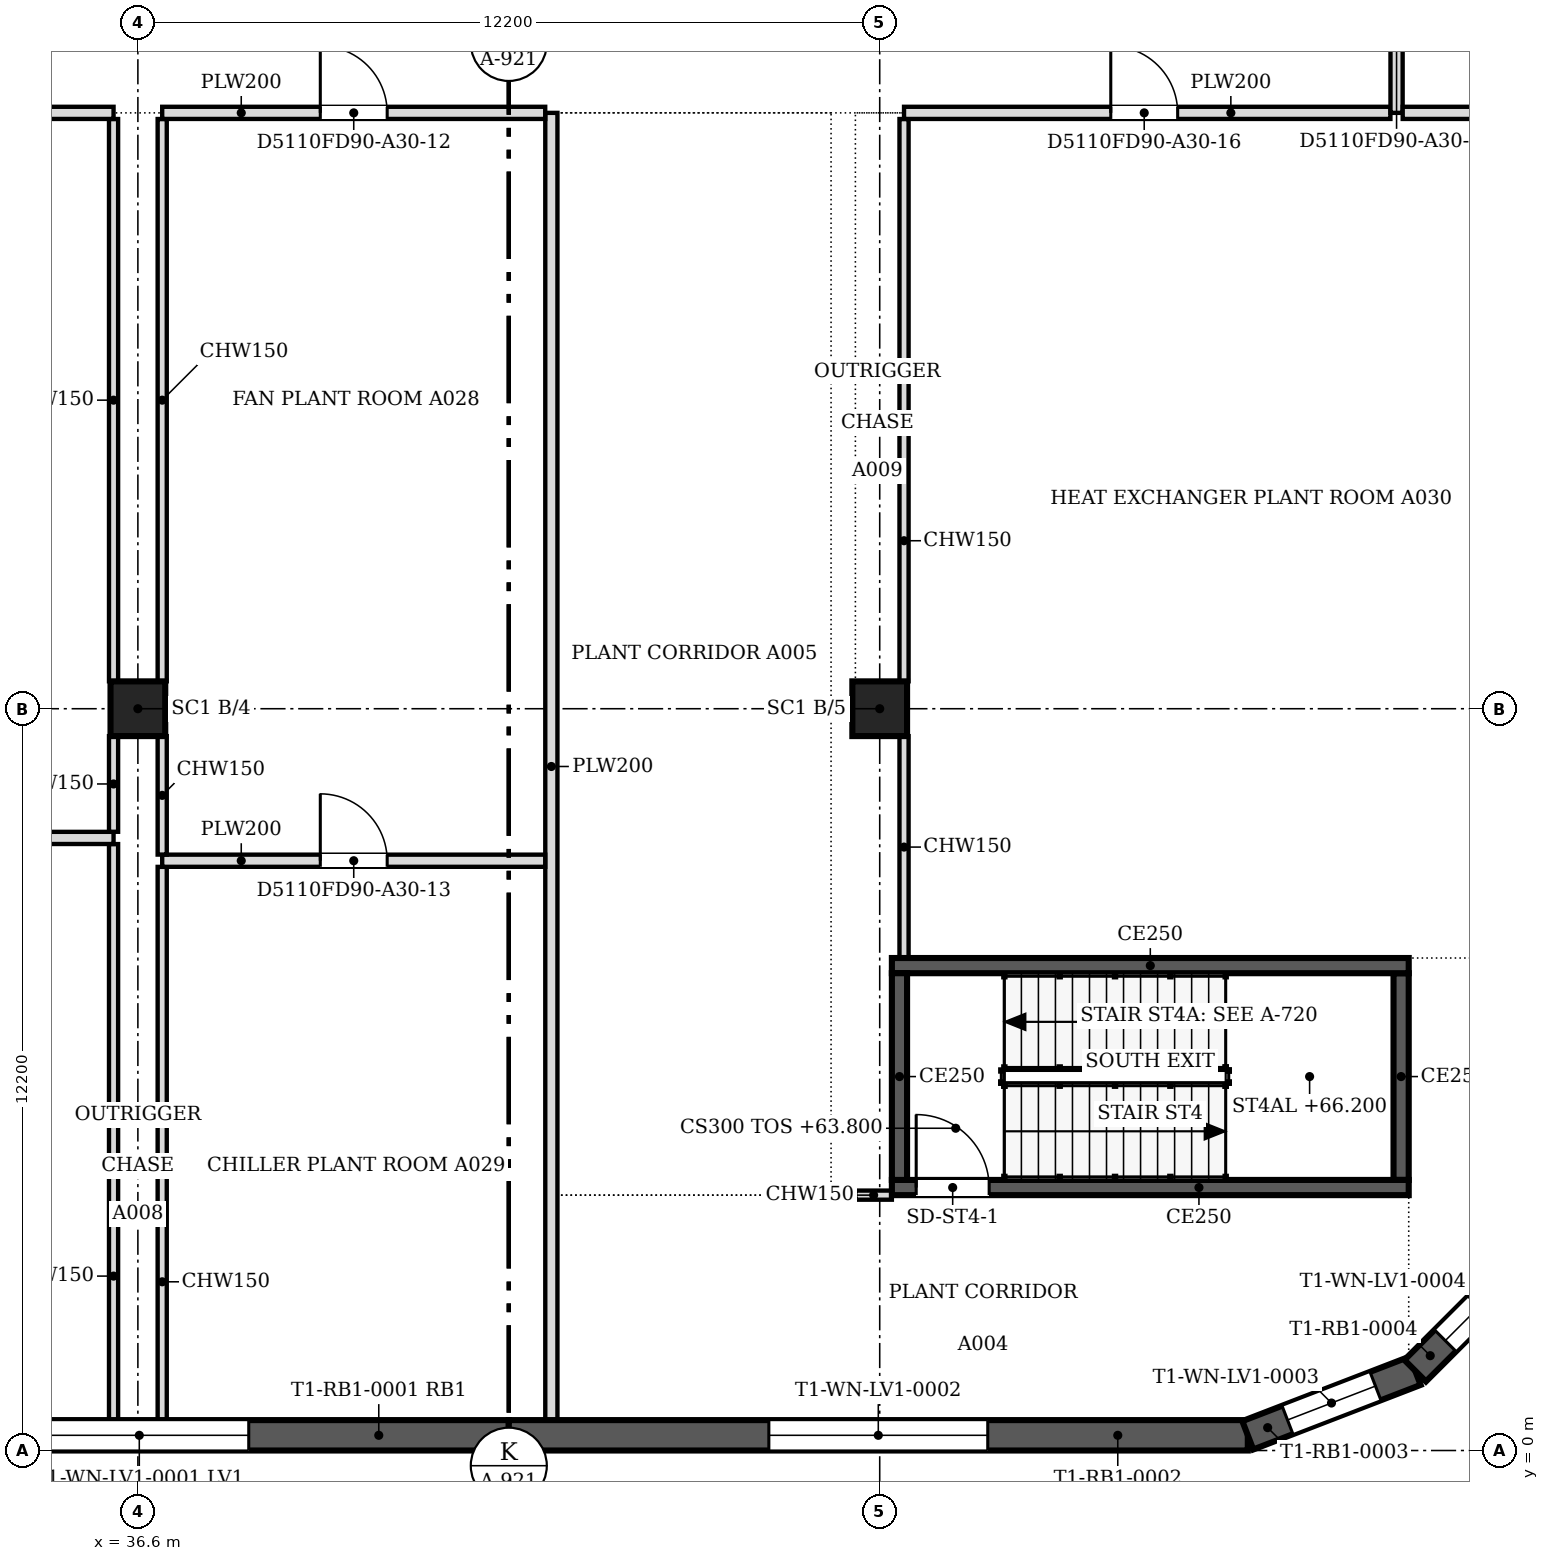
"""IFC4 building model, lengths in metres.
Left out: names, types, materials, properties, quantities, classifications, styles, units other than length and angle.
Written with IfcOpenShell. Run it as: python <this file> out.ifc"""

import sys

from ifc_helpers import new_model, si_unit, direction, frame, frame_2d, origin, origin_2d, place, context, subcontext, project, spatial, polyline, rectangle, outline, extrude, faceted_brep, source, transform, mapped, element, fill, save


model = new_model("IFC4")
c1 = context("Model", 3, precision=1e-05, world=origin(), true_north=direction((0.0, 1.0)))
c2 = subcontext(c1, "Body", "Model", "MODEL_VIEW")
j1 = project(units=[si_unit("LENGTHUNIT", "METRE"), si_unit("PLANEANGLEUNIT", "RADIAN")], contexts=[c1])
p1 = place(None, origin())
s1 = spatial("IfcSite", under=j1, at=p1, CompositionType="ELEMENT")
p2 = place(p1, origin())
s2 = spatial("IfcBuilding", under=s1, at=p2, CompositionType="ELEMENT")
p3 = place(p2, frame((0.0, 0.0, 63.8)))
s3 = spatial("IfcBuildingStorey", under=s2, at=p3, CompositionType="ELEMENT", Elevation=63.8)
for number, where, z_axis, x_axis in (
    (1, (36.6, 12.2, 0.0), (0.0, 0.0, 1.0), (1.0, 0.0, 0.0)),
    (2, (48.8, 12.2, 0.0), (0.0, 0.0, 1.0), (1.0, 0.0, 0.0)),
):
    element("IfcColumn", number, at=place(p3, frame(where, z_axis=z_axis, x_axis=x_axis)), inside=s3, PredefinedType="COLUMN", context=c2, shape_type="SweptSolid", body=[
        extrude(rectangle(XDim=0.9, YDim=0.9, at=origin_2d()), origin(), (0.0, 0.0, 1.0), 4.6),
    ])
m1 = source(origin(), c2, "Body", "Brep", [
    faceted_brep([(0.0, -0.25, 0.0), (12.154, -0.25, 0.0), (12.154, -0.25, 4.8), (0.0, -0.25, 4.8), (0.047, 0.25, 4.8), (12.154, 0.25, 4.8), (12.154, 0.25, 0.0), (0.047, 0.25, 0.0), (0.0, 0.0, 0.0), (0.0, 0.0, 4.8)], [[[0, 1, 2, 3]], [[4, 5, 6, 7]], [[7, 6, 1, 0, 8]], [[5, 4, 9, 3, 2]], [[8, 0, 3, 9]], [[7, 8, 9, 4]], [[1, 6, 5, 2]]]),
])
p4 = place(p3, frame((30.547, 0.25, 0.0), z_axis=(0.0, 0.0, 1.0), x_axis=(1.0, 0.0, 0.0)))
e3 = element("IfcWall", 3, at=p4, inside=s3, PredefinedType="SOLIDWALL", context=c2, shape_type="MappedRepresentation", body=[
    mapped(m1, transform((0.0, 0.0, 0.0), scale=1.0)),
])
m2 = source(origin(), c2, "Body", "SweptSolid", [
    extrude(outline(polyline([(4.277, 0.8), (7.877, 0.8), (7.877, 4.0), (4.277, 4.0), (4.277, 0.8)])), frame((0.0, 0.26, 0.0), z_axis=(0.0, -1.0, 0.0), x_axis=(1.0, 0.0, 0.0)), (0.0, 0.0, 1.0), 0.52),
])
p5 = place(p4, origin())
e4 = element("IfcOpeningElement", 4, at=p5, cuts=e3, PredefinedType="OPENING", context=c2, shape_type="MappedRepresentation", body=[
    mapped(m2, transform((0.0, 0.0, 0.0), scale=1.0)),
])
m3 = source(origin(), c2, "Body", "Brep", [
    faceted_brep([(0.0, -0.25, 0.0), (12.154, -0.25, 0.0), (12.154, -0.25, 4.8), (0.0, -0.25, 4.8), (0.0, 0.25, 4.8), (12.107, 0.25, 4.8), (12.107, 0.25, 0.0), (0.0, 0.25, 0.0), (12.154, -0.0, 0.0), (12.154, -0.0, 4.8)], [[[0, 1, 2, 3]], [[4, 5, 6, 7]], [[7, 6, 8, 1, 0]], [[9, 2, 1, 8]], [[5, 4, 3, 2, 9]], [[4, 7, 0, 3]], [[8, 6, 5, 9]]]),
])
p6 = place(p3, frame((42.7, 0.25, 0.0), z_axis=(0.0, 0.0, 1.0), x_axis=(1.0, 0.0, 0.0)))
e5 = element("IfcWall", 5, at=p6, inside=s3, PredefinedType="SOLIDWALL", context=c2, shape_type="MappedRepresentation", body=[
    mapped(m3, transform((0.0, 0.0, 0.0), scale=1.0)),
])
p7 = place(p6, origin())
e6 = element("IfcOpeningElement", 6, at=p7, cuts=e5, PredefinedType="OPENING", context=c2, shape_type="MappedRepresentation", body=[
    mapped(m2, transform((0.0, 0.0, 0.0), scale=1.0)),
])
m4 = source(origin(), c2, "Body", "Brep", [
    faceted_brep([(0.0, -0.25, 0.0), (2.95, -0.25, 0.0), (2.95, -0.25, 4.8), (0.0, -0.25, 4.8), (0.047, 0.25, 4.8), (2.898, 0.25, 4.8), (2.898, 0.25, 0.0), (0.047, 0.25, 0.0), (2.95, 0.0, 0.0), (0.0, 0.0, 0.0), (2.95, 0.0, 4.8), (0.0, 0.0, 4.8)], [[[0, 1, 2, 3]], [[4, 5, 6, 7]], [[7, 6, 8, 1, 0, 9]], [[10, 2, 1, 8]], [[5, 4, 11, 3, 2, 10]], [[9, 0, 3, 11]], [[7, 9, 11, 4]], [[8, 6, 5, 10]]]),
])
p8 = place(p3, frame((54.854, 0.25, 0.0), z_axis=(0.0, 0.0, 1.0), x_axis=(0.932999673775, 0.359877213415, 0.0)))
e7 = element("IfcWall", 7, at=p8, inside=s3, PredefinedType="SOLIDWALL", context=c2, shape_type="MappedRepresentation", body=[
    mapped(m4, transform((0.0, 0.0, 0.0), scale=1.0)),
])
m5 = source(origin(), c2, "Body", "SweptSolid", [
    extrude(outline(polyline([(0.7, 0.8), (2.25, 0.8), (2.25, 4.0), (0.7, 4.0), (0.7, 0.8)])), frame((0.0, 0.26, 0.0), z_axis=(0.0, -1.0, 0.0), x_axis=(1.0, 0.0, 0.0)), (0.0, 0.0, 1.0), 0.52),
])
p9 = place(p8, origin())
e8 = element("IfcOpeningElement", 8, at=p9, cuts=e7, PredefinedType="OPENING", context=c2, shape_type="MappedRepresentation", body=[
    mapped(m5, transform((0.0, 0.0, 0.0), scale=1.0)),
])
m6 = source(origin(), c2, "Body", "Brep", [
    faceted_brep([(0.0, -0.25, 0.0), (2.944, -0.25, 0.0), (2.944, -0.25, 4.8), (0.0, -0.25, 4.8), (0.053, 0.25, 4.8), (2.891, 0.25, 4.8), (2.891, 0.25, 0.0), (0.053, 0.25, 0.0), (2.944, 0.0, 0.0), (0.0, 0.0, 0.0), (2.944, 0.0, 4.8), (0.0, 0.0, 4.8)], [[[0, 1, 2, 3]], [[4, 5, 6, 7]], [[7, 6, 8, 1, 0, 9]], [[10, 2, 1, 8]], [[5, 4, 11, 3, 2, 10]], [[9, 0, 3, 11]], [[7, 9, 11, 4]], [[8, 6, 5, 10]]]),
])
p10 = place(p3, frame((57.606, 1.312, 0.0), z_axis=(0.0, 0.0, 1.0), x_axis=(0.707106781187, 0.707106781187, 0.0)))
e9 = element("IfcWall", 9, at=p10, inside=s3, PredefinedType="SOLIDWALL", context=c2, shape_type="MappedRepresentation", body=[
    mapped(m6, transform((0.0, 0.0, 0.0), scale=1.0)),
])
m7 = source(origin(), c2, "Body", "SweptSolid", [
    extrude(outline(polyline([(0.7, 0.8), (2.244, 0.8), (2.244, 4.0), (0.7, 4.0), (0.7, 0.8)])), frame((0.0, 0.26, 0.0), z_axis=(0.0, -1.0, 0.0), x_axis=(1.0, 0.0, 0.0)), (0.0, 0.0, 1.0), 0.52),
])
p11 = place(p10, origin())
e10 = element("IfcOpeningElement", 10, at=p11, cuts=e9, PredefinedType="OPENING", context=c2, shape_type="MappedRepresentation", body=[
    mapped(m7, transform((0.0, 0.0, 0.0), scale=1.0)),
])
p12 = place(p3, frame((57.5, 4.325, 0.0), z_axis=(0.0, 0.0, 1.0), x_axis=(-1.0, 0.0, 0.0)))
e11 = element("IfcWall", 11, at=p12, inside=s3, PredefinedType="SOLIDWALL", context=c2, shape_type="SweptSolid", body=[
    extrude(rectangle(XDim=8.5, YDim=0.25, at=frame_2d((4.25, 0.0))), origin(), (0.0, 0.0, 1.0), 4.8),
])
m8 = source(origin(), c2, "Body", "SweptSolid", [
    extrude(rectangle(XDim=1.2, YDim=2.1, at=frame_2d((0.6, 1.05))), frame((0.0, 0.135, 0.0), z_axis=(0.0, -1.0, 0.0), x_axis=(1.0, 0.0, 0.0)), (0.0, 0.0, 1.0), 0.27),
])
p13 = place(p12, frame((6.9, 0.0, 0.0)))
e12 = element("IfcOpeningElement", 12, at=p13, cuts=e11, PredefinedType="OPENING", context=c2, shape_type="MappedRepresentation", body=[
    mapped(m8, transform((0.0, 0.0, 0.0), scale=1.0)),
])
p14 = place(p3, frame((49.125, 4.45, 0.0), z_axis=(0.0, 0.0, 1.0), x_axis=(0.0, 1.0, 0.0)))
e13 = element("IfcWall", 13, at=p14, inside=s3, PredefinedType="SOLIDWALL", context=c2, shape_type="SweptSolid", body=[
    extrude(rectangle(XDim=3.4, YDim=0.25, at=frame_2d((1.7, 0.0))), origin(), (0.0, 0.0, 1.0), 4.8),
])
p15 = place(p3, frame((49.0, 7.975, 0.0), z_axis=(0.0, 0.0, 1.0), x_axis=(1.0, 0.0, 0.0)))
e14 = element("IfcWall", 14, at=p15, inside=s3, PredefinedType="SOLIDWALL", context=c2, shape_type="SweptSolid", body=[
    extrude(rectangle(XDim=8.5, YDim=0.25, at=frame_2d((4.25, 0.0))), origin(), (0.0, 0.0, 1.0), 4.8),
])
p16 = place(p3, frame((57.375, 7.85, 0.0), z_axis=(0.0, 0.0, 1.0), x_axis=(0.0, -1.0, 0.0)))
e15 = element("IfcWall", 15, at=p16, inside=s3, PredefinedType="SOLIDWALL", context=c2, shape_type="SweptSolid", body=[
    extrude(rectangle(XDim=3.4, YDim=0.25, at=frame_2d((1.7, 0.0))), origin(), (0.0, 0.0, 1.0), 4.8),
])
p17 = place(p3, frame((36.2, 0.5, 0.0), z_axis=(0.0, 0.0, 1.0), x_axis=(0.0, 1.0, 0.0)))
e16 = element("IfcWall", 16, at=p17, inside=s3, PredefinedType="PARTITIONING", context=c2, shape_type="SweptSolid", body=[
    extrude(rectangle(XDim=9.474, YDim=0.15, at=frame_2d((4.737, 0.0))), origin(), (0.0, 0.0, 1.0), 4.067),
])
p18 = place(p3, frame((37.0, 0.5, 0.0), z_axis=(0.0, 0.0, 1.0), x_axis=(0.0, 1.0, 0.0)))
e17 = element("IfcWall", 17, at=p18, inside=s3, PredefinedType="PARTITIONING", context=c2, shape_type="SweptSolid", body=[
    extrude(rectangle(XDim=9.099, YDim=0.15, at=frame_2d((4.55, 0.0))), origin(), (0.0, 0.0, 1.0), 4.067),
])
p19 = place(p3, frame((43.4, 0.5, 0.0), z_axis=(0.0, 0.0, 1.0), x_axis=(0.0, 1.0, 0.0)))
e18 = element("IfcWall", 18, at=p19, inside=s3, PredefinedType="PARTITIONING", context=c2, shape_type="SweptSolid", body=[
    extrude(rectangle(XDim=21.5, YDim=0.2, at=frame_2d((10.75, 0.0))), origin(), (0.0, 0.0, 1.0), 4.067),
])
p20 = place(p3, frame((48.4, 4.2, 0.0), z_axis=(0.0, 0.0, 1.0), x_axis=(1.0, 0.0, 0.0)))
e19 = element("IfcWall", 19, at=p20, inside=s3, PredefinedType="PARTITIONING", context=c2, shape_type="SweptSolid", body=[
    extrude(rectangle(XDim=0.6, YDim=0.15, at=frame_2d((0.3, 0.0))), origin(), (0.0, 0.0, 1.0), 4.067),
])
p21 = place(p3, frame((49.2, 8.1, 0.0), z_axis=(0.0, 0.0, 1.0), x_axis=(0.0, 1.0, 0.0)))
e20 = element("IfcWall", 20, at=p21, inside=s3, PredefinedType="PARTITIONING", context=c2, shape_type="SweptSolid", body=[
    extrude(rectangle(XDim=3.649, YDim=0.15, at=frame_2d((1.824, 0.0))), origin(), (0.0, 0.0, 1.0), 4.067),
])
p22 = place(p3, frame((43.299, 9.7, 0.0), z_axis=(0.0, 0.0, 1.0), x_axis=(-1.0, 0.0, 0.0)))
e21 = element("IfcWall", 21, at=p22, inside=s3, PredefinedType="PARTITIONING", context=c2, shape_type="SweptSolid", body=[
    extrude(rectangle(XDim=6.299, YDim=0.2, at=frame_2d((3.149, 0.0))), origin(), (0.0, 0.0, 1.0), 4.067),
])
m9 = source(origin(), c2, "Body", "SweptSolid", [
    extrude(rectangle(XDim=1.1, YDim=2.1, at=frame_2d((0.55, 1.05))), frame((0.0, 0.11, 0.0), z_axis=(0.0, -1.0, 0.0), x_axis=(1.0, 0.0, 0.0)), (0.0, 0.0, 1.0), 0.22),
])
p23 = place(p22, frame((2.599, 0.0, 0.0)))
e22 = element("IfcOpeningElement", 22, at=p23, cuts=e21, PredefinedType="OPENING", context=c2, shape_type="MappedRepresentation", body=[
    mapped(m9, transform((0.0, 0.0, 0.0), scale=1.0)),
])
p24 = place(p3, frame((37.0, 9.801, 0.0), z_axis=(0.0, 0.0, 1.0), x_axis=(0.0, 1.0, 0.0)))
e23 = element("IfcWall", 23, at=p24, inside=s3, PredefinedType="PARTITIONING", context=c2, shape_type="SweptSolid", body=[
    extrude(rectangle(XDim=1.948, YDim=0.15, at=frame_2d((0.974, 0.0))), origin(), (0.0, 0.0, 1.0), 4.067),
])
p25 = place(p3, frame((36.2, 10.075, 0.0), z_axis=(0.0, 0.0, 1.0), x_axis=(-1.0, 0.0, 0.0)))
e24 = element("IfcWall", 24, at=p25, inside=s3, PredefinedType="PARTITIONING", context=c2, shape_type="SweptSolid", body=[
    extrude(rectangle(XDim=11.3, YDim=0.2, at=frame_2d((5.65, 0.0))), origin(), (0.0, 0.0, 1.0), 4.067),
])
p26 = place(p25, frame((5.1, 0.0, 0.0)))
e25 = element("IfcOpeningElement", 25, at=p26, cuts=e24, PredefinedType="OPENING", context=c2, shape_type="MappedRepresentation", body=[
    mapped(m9, transform((0.0, 0.0, 0.0), scale=1.0)),
])
p27 = place(p3, frame((36.2, 10.176, 0.0), z_axis=(0.0, 0.0, 1.0), x_axis=(0.0, 1.0, 0.0)))
e26 = element("IfcWall", 26, at=p27, inside=s3, PredefinedType="PARTITIONING", context=c2, shape_type="SweptSolid", body=[
    extrude(rectangle(XDim=1.573, YDim=0.15, at=frame_2d((0.787, 0.0))), origin(), (0.0, 0.0, 1.0), 4.067),
])
for number, where, z_axis, x_axis in (
    (27, (36.2, 12.651, 0.0), (0.0, 0.0, 1.0), (0.0, 1.0, 0.0)),
    (28, (37.0, 12.651, 0.0), (0.0, 0.0, 1.0), (0.0, 1.0, 0.0)),
    (29, (49.2, 12.651, 0.0), (0.0, 0.0, 1.0), (0.0, 1.0, 0.0)),
):
    element("IfcWall", number, at=place(p3, frame(where, z_axis=z_axis, x_axis=x_axis)), inside=s3, PredefinedType="PARTITIONING", context=c2, shape_type="SweptSolid", body=[
        extrude(rectangle(XDim=9.248, YDim=0.15, at=frame_2d((4.624, 0.0))), origin(), (0.0, 0.0, 1.0), 4.067),
    ])
p28 = place(p3, frame((36.2, 22.0, 0.0), z_axis=(0.0, 0.0, 1.0), x_axis=(-1.0, 0.0, 0.0)))
e30 = element("IfcWall", 30, at=p28, inside=s3, PredefinedType="PARTITIONING", context=c2, shape_type="SweptSolid", body=[
    extrude(rectangle(XDim=5.7, YDim=0.2, at=frame_2d((2.85, 0.0))), origin(), (0.0, 0.0, 1.0), 4.067),
])
p29 = place(p28, frame((2.3, 0.0, 0.0)))
e31 = element("IfcOpeningElement", 31, at=p29, cuts=e30, PredefinedType="OPENING", context=c2, shape_type="MappedRepresentation", body=[
    mapped(m9, transform((0.0, 0.0, 0.0), scale=1.0)),
])
p30 = place(p3, frame((43.299, 22.0, 0.0), z_axis=(0.0, 0.0, 1.0), x_axis=(-1.0, 0.0, 0.0)))
e32 = element("IfcWall", 32, at=p30, inside=s3, PredefinedType="PARTITIONING", context=c2, shape_type="SweptSolid", body=[
    extrude(rectangle(XDim=6.299, YDim=0.2, at=frame_2d((3.149, 0.0))), origin(), (0.0, 0.0, 1.0), 4.067),
])
p31 = place(p30, frame((2.599, 0.0, 0.0)))
e33 = element("IfcOpeningElement", 33, at=p31, cuts=e32, PredefinedType="OPENING", context=c2, shape_type="MappedRepresentation", body=[
    mapped(m9, transform((0.0, 0.0, 0.0), scale=1.0)),
])
p32 = place(p3, frame((57.199, 22.0, 0.0), z_axis=(0.0, 0.0, 1.0), x_axis=(-1.0, 0.0, 0.0)))
e34 = element("IfcWall", 34, at=p32, inside=s3, PredefinedType="PARTITIONING", context=c2, shape_type="SweptSolid", body=[
    extrude(rectangle(XDim=7.999, YDim=0.2, at=frame_2d((4.0, 0.0))), origin(), (0.0, 0.0, 1.0), 4.067),
])
p33 = place(p32, frame((3.499, 0.0, 0.0)))
e35 = element("IfcOpeningElement", 35, at=p33, cuts=e34, PredefinedType="OPENING", context=c2, shape_type="MappedRepresentation", body=[
    mapped(m9, transform((0.0, 0.0, 0.0), scale=1.0)),
])
p34 = place(p3, frame((57.3, 30.6, 0.0), z_axis=(0.0, 0.0, 1.0), x_axis=(0.0, -1.0, 0.0)))
e36 = element("IfcWall", 36, at=p34, inside=s3, PredefinedType="PARTITIONING", context=c2, shape_type="SweptSolid", body=[
    extrude(rectangle(XDim=8.6, YDim=0.2, at=frame_2d((4.3, 0.0))), origin(), (0.0, 0.0, 1.0), 4.067),
])
p35 = place(p34, frame((3.8, 0.0, 0.0)))
e37 = element("IfcOpeningElement", 37, at=p35, cuts=e36, PredefinedType="OPENING", context=c2, shape_type="MappedRepresentation", body=[
    mapped(m9, transform((0.0, 0.0, 0.0), scale=1.0)),
])
p36 = place(p3, frame((57.401, 22.0, 0.0), z_axis=(0.0, 0.0, 1.0), x_axis=(1.0, 0.0, 0.0)))
e38 = element("IfcWall", 38, at=p36, inside=s3, PredefinedType="PARTITIONING", context=c2, shape_type="SweptSolid", body=[
    extrude(rectangle(XDim=3.099, YDim=0.2, at=frame_2d((1.55, 0.0))), origin(), (0.0, 0.0, 1.0), 4.067),
])
m10 = source(origin(), c2, "Body", "SweptSolid", [
    extrude(outline(polyline([(4.277, 0.8), (7.877, 0.8), (7.877, 4.0), (4.277, 4.0), (4.277, 0.8)])), frame((0.0, 0.03, 0.0), z_axis=(0.0, -1.0, 0.0), x_axis=(1.0, 0.0, 0.0)), (0.0, 0.0, 1.0), 0.06),
])
p37 = place(p5, origin())
e39 = element("IfcWindow", 39, at=p37, inside=s3, PartitioningType="USERDEFINED", PredefinedType="WINDOW", context=c2, shape_type="MappedRepresentation", body=[
    mapped(m10, transform((0.0, 0.0, 0.0), scale=1.0)),
])
fill(e4, e39)
p38 = place(p7, origin())
e40 = element("IfcWindow", 40, at=p38, inside=s3, PartitioningType="USERDEFINED", PredefinedType="WINDOW", context=c2, shape_type="MappedRepresentation", body=[
    mapped(m10, transform((0.0, 0.0, 0.0), scale=1.0)),
])
fill(e6, e40)
m11 = source(origin(), c2, "Body", "SweptSolid", [
    extrude(outline(polyline([(0.7, 0.8), (2.25, 0.8), (2.25, 4.0), (0.7, 4.0), (0.7, 0.8)])), frame((0.0, 0.03, 0.0), z_axis=(0.0, -1.0, 0.0), x_axis=(1.0, 0.0, 0.0)), (0.0, 0.0, 1.0), 0.06),
])
p39 = place(p9, origin())
e41 = element("IfcWindow", 41, at=p39, inside=s3, PartitioningType="USERDEFINED", PredefinedType="WINDOW", context=c2, shape_type="MappedRepresentation", body=[
    mapped(m11, transform((0.0, 0.0, 0.0), scale=1.0)),
])
fill(e8, e41)
m12 = source(origin(), c2, "Body", "SweptSolid", [
    extrude(outline(polyline([(0.7, 0.8), (2.244, 0.8), (2.244, 4.0), (0.7, 4.0), (0.7, 0.8)])), frame((0.0, 0.03, 0.0), z_axis=(0.0, -1.0, 0.0), x_axis=(1.0, 0.0, 0.0)), (0.0, 0.0, 1.0), 0.06),
])
p40 = place(p11, origin())
e42 = element("IfcWindow", 42, at=p40, inside=s3, PartitioningType="USERDEFINED", PredefinedType="WINDOW", context=c2, shape_type="MappedRepresentation", body=[
    mapped(m12, transform((0.0, 0.0, 0.0), scale=1.0)),
])
fill(e10, e42)
m13 = source(origin(), c2, "Body", "SweptSolid", [
    extrude(rectangle(XDim=1.2, YDim=2.1, at=frame_2d((0.6, 1.05))), frame((0.0, 0.025, 0.0), z_axis=(0.0, -1.0, 0.0), x_axis=(1.0, 0.0, 0.0)), (0.0, 0.0, 1.0), 0.05),
])
p41 = place(p13, origin())
e43 = element("IfcDoor", 43, at=p41, inside=s3, OperationType="SINGLE_SWING_RIGHT", PredefinedType="DOOR", context=c2, shape_type="MappedRepresentation", body=[
    mapped(m13, transform((0.0, 0.0, 0.0), scale=1.0)),
])
fill(e12, e43)
m14 = source(origin(), c2, "Body", "SweptSolid", [
    extrude(rectangle(XDim=1.1, YDim=2.1, at=frame_2d((0.55, 1.05))), frame((0.0, 0.025, 0.0), z_axis=(0.0, -1.0, 0.0), x_axis=(1.0, 0.0, 0.0)), (0.0, 0.0, 1.0), 0.05),
])
p42 = place(p31, origin())
e44 = element("IfcDoor", 44, at=p42, inside=s3, OperationType="SINGLE_SWING_RIGHT", PredefinedType="DOOR", context=c2, shape_type="MappedRepresentation", body=[
    mapped(m14, transform((0.0, 0.0, 0.0), scale=1.0)),
])
fill(e33, e44)
p43 = place(p23, origin())
e45 = element("IfcDoor", 45, at=p43, inside=s3, OperationType="SINGLE_SWING_RIGHT", PredefinedType="DOOR", context=c2, shape_type="MappedRepresentation", body=[
    mapped(m14, transform((0.0, 0.0, 0.0), scale=1.0)),
])
fill(e22, e45)
p44 = place(p33, origin())
e46 = element("IfcDoor", 46, at=p44, inside=s3, OperationType="SINGLE_SWING_RIGHT", PredefinedType="DOOR", context=c2, shape_type="MappedRepresentation", body=[
    mapped(m14, transform((0.0, 0.0, 0.0), scale=1.0)),
])
fill(e35, e46)
save(model, sys.argv[1])
